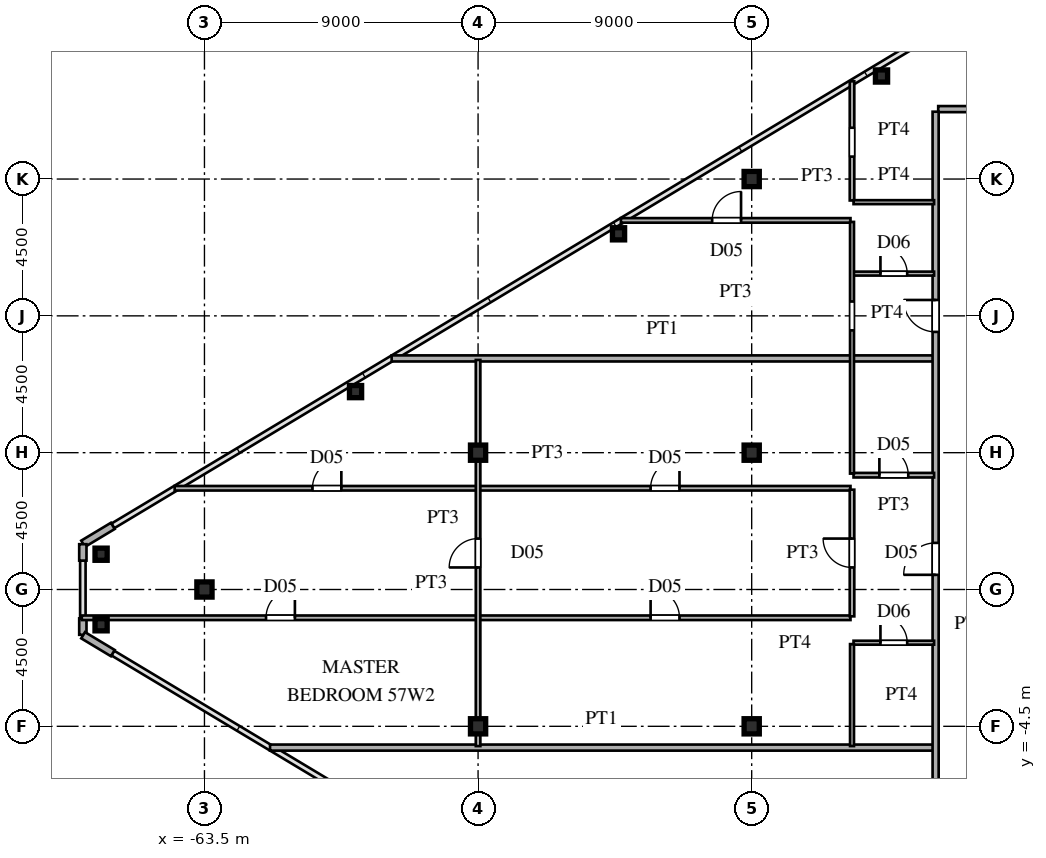
"""IFC4 building model, lengths in metres.
Left out: names, types, materials, properties, quantities, classifications, styles, units other than length and angle.
Written with IfcOpenShell. Run it as: python <this file> out.ifc"""

import sys

from ifc_helpers import new_model, si_unit, direction, frame, frame_2d, origin, origin_2d, place, context, subcontext, project, spatial, rectangle, hollow_rectangle, i_section, extrude, source, transform, mapped, element, fill, save


model = new_model("IFC4")
c1 = context("Model", 3, precision=1e-05, world=origin(), true_north=direction((0.0, 1.0)))
c2 = subcontext(c1, "Body", "Model", "MODEL_VIEW")
j1 = project(units=[si_unit("LENGTHUNIT", "METRE"), si_unit("PLANEANGLEUNIT", "RADIAN")], contexts=[c1])
p1 = place(None, origin())
s1 = spatial("IfcSite", under=j1, at=p1, CompositionType="ELEMENT")
p2 = place(p1, origin())
s2 = spatial("IfcBuilding", under=s1, at=p2, CompositionType="ELEMENT")
p3 = place(p2, frame((0.0, 0.0, 213.9)))
s3 = spatial("IfcBuildingStorey", under=s2, at=p3, CompositionType="ELEMENT", Elevation=213.9)
m1 = source(origin(), c2, "Body", "SweptSolid", [
    extrude(i_section(OverallWidth=0.5, OverallDepth=0.5, WebThickness=0.02, FlangeThickness=0.032, at=origin_2d()), origin(), (0.0, 0.0, 1.0), 3.6),
])
for number, where, z_axis, x_axis in (
    (1, (-45.5, -4.5, 0.0), (0.0, 0.0, 1.0), (1.0, 0.0, 0.0)),
    (2, (-45.5, 4.5, 0.0), (0.0, 0.0, 1.0), (1.0, 0.0, 0.0)),
    (3, (-45.5, 13.5, 0.0), (0.0, 0.0, 1.0), (1.0, 0.0, 0.0)),
    (4, (-54.5, -4.5, 0.0), (0.0, 0.0, 1.0), (1.0, 0.0, 0.0)),
    (5, (-54.5, 4.5, 0.0), (0.0, 0.0, 1.0), (1.0, 0.0, 0.0)),
    (6, (-63.5, 0.0, 0.0), (0.0, 0.0, 1.0), (1.0, 0.0, 0.0)),
):
    element("IfcColumn", number, at=place(p3, frame(where, z_axis=z_axis, x_axis=x_axis)), inside=s3, PredefinedType="COLUMN", context=c2, shape_type="MappedRepresentation", body=[
        mapped(m1, transform((0.0, 0.0, 0.0), scale=1.0)),
    ])
m2 = source(origin(), c2, "Body", "SweptSolid", [
    extrude(hollow_rectangle(XDim=0.4, YDim=0.4, WallThickness=0.016, at=origin_2d()), origin(), (0.0, 0.0, 1.0), 3.6),
])
for number, where, z_axis, x_axis in (
    (7, (-66.9, 1.16, 0.0), (0.0, 0.0, 1.0), (1.0, 0.0, 0.0)),
    (8, (-66.9, -1.16, 0.0), (0.0, 0.0, 1.0), (1.0, 0.0, 0.0)),
    (9, (-41.23, 16.889, 0.0), (0.0, 0.0, 1.0), (1.0, 0.0, 0.0)),
    (10, (-49.88, 11.699, 0.0), (0.0, 0.0, 1.0), (1.0, 0.0, 0.0)),
    (11, (-58.53, 6.509, 0.0), (0.0, 0.0, 1.0), (1.0, 0.0, 0.0)),
):
    element("IfcColumn", number, at=place(p3, frame(where, z_axis=z_axis, x_axis=x_axis)), inside=s3, PredefinedType="COLUMN", context=c2, shape_type="MappedRepresentation", body=[
        mapped(m2, transform((0.0, 0.0, 0.0), scale=1.0)),
    ])
p4 = place(p3, frame((-66.514, 2.092, 0.0), z_axis=(0.0, 0.0, 1.0), x_axis=(-0.85743623509, -0.514590228002, 0.0)))
e12 = element("IfcWall", 12, at=p4, inside=s3, PredefinedType="SOLIDWALL", context=c2, shape_type="SweptSolid", body=[
    extrude(rectangle(XDim=1.14, YDim=0.24, at=frame_2d((0.57, 0.0))), origin(), (0.0, 0.0, 1.0), 3.38),
])
for number, where, z_axis, x_axis in (
    (13, (-67.5, 1.49, 0.0), (0.0, 0.0, 1.0), (0.0, -1.0, 0.0)),
    (14, (-67.5, -0.95, 0.0), (0.0, 0.0, 1.0), (0.0, -1.0, 0.0)),
):
    element("IfcWall", number, at=place(p3, frame(where, z_axis=z_axis, x_axis=x_axis)), inside=s3, PredefinedType="SOLIDWALL", context=c2, shape_type="SweptSolid", body=[
        extrude(rectangle(XDim=0.54, YDim=0.24, at=frame_2d((0.27, 0.0))), origin(), (0.0, 0.0, 1.0), 3.38),
    ])
p5 = place(p3, frame((-67.491, -1.505, 0.0), z_axis=(0.0, 0.0, 1.0), x_axis=(0.85743623509, -0.514590228002, 0.0)))
e15 = element("IfcWall", 15, at=p5, inside=s3, PredefinedType="SOLIDWALL", context=c2, shape_type="SweptSolid", body=[
    extrude(rectangle(XDim=1.14, YDim=0.24, at=frame_2d((0.57, 0.0))), origin(), (0.0, 0.0, 1.0), 3.38),
])
p6 = place(p3, frame((-61.343, -5.2, 0.0), z_axis=(0.0, 0.0, 1.0), x_axis=(1.0, 0.0, 0.0)))
e16 = element("IfcWall", 16, at=p6, inside=s3, PredefinedType="PARTITIONING", context=c2, shape_type="SweptSolid", body=[
    extrude(rectangle(XDim=21.813, YDim=0.2, at=frame_2d((10.906, 0.0))), origin(), (0.0, 0.0, 1.0), 3.38),
])
p7 = place(p3, frame((-42.15, -1.75, 0.0), z_axis=(0.0, 0.0, 1.0), x_axis=(1.0, 0.0, 0.0)))
e17 = element("IfcWall", 17, at=p7, inside=s3, PredefinedType="PARTITIONING", context=c2, shape_type="SweptSolid", body=[
    extrude(rectangle(XDim=2.65, YDim=0.13, at=frame_2d((1.325, 0.0))), origin(), (0.0, 0.0, 1.0), 3.38),
])
p8 = place(p7, frame((0.885, 0.0, 0.0)))
e18 = element("IfcOpeningElement", 18, at=p8, cuts=e17, PredefinedType="OPENING", context=c2, shape_type="SweptSolid", body=[
    extrude(rectangle(XDim=0.88, YDim=2.1, at=frame_2d((0.44, 1.05))), frame((0.0, 0.075, 0.0), z_axis=(0.0, -1.0, 0.0), x_axis=(1.0, 0.0, 0.0)), (0.0, 0.0, 1.0), 0.15),
])
p9 = place(p3, frame((-67.535, -0.93, 0.0), z_axis=(0.0, 0.0, 1.0), x_axis=(1.0, 0.0, 0.0)))
e19 = element("IfcWall", 19, at=p9, inside=s3, PredefinedType="PARTITIONING", context=c2, shape_type="SweptSolid", body=[
    extrude(rectangle(XDim=25.285, YDim=0.15, at=frame_2d((12.643, 0.0))), origin(), (0.0, 0.0, 1.0), 3.38),
])
p10 = place(p9, frame((18.71, 0.0, 0.0)))
e20 = element("IfcOpeningElement", 20, at=p10, cuts=e19, PredefinedType="OPENING", context=c2, shape_type="SweptSolid", body=[
    extrude(rectangle(XDim=0.95, YDim=2.15, at=frame_2d((0.475, 1.075))), frame((0.0, 0.085, 0.0), z_axis=(0.0, -1.0, 0.0), x_axis=(1.0, 0.0, 0.0)), (0.0, 0.0, 1.0), 0.17),
])
p11 = place(p9, frame((6.06, 0.0, 0.0)))
e21 = element("IfcOpeningElement", 21, at=p11, cuts=e19, PredefinedType="OPENING", context=c2, shape_type="SweptSolid", body=[
    extrude(rectangle(XDim=0.95, YDim=2.15, at=frame_2d((0.475, 1.075))), frame((0.0, 0.085, 0.0), z_axis=(0.0, -1.0, 0.0), x_axis=(1.0, 0.0, 0.0)), (0.0, 0.0, 1.0), 0.17),
])
p12 = place(p3, frame((-64.48, 3.33, 0.0), z_axis=(0.0, 0.0, 1.0), x_axis=(1.0, 0.0, 0.0)))
e22 = element("IfcWall", 22, at=p12, inside=s3, PredefinedType="PARTITIONING", context=c2, shape_type="SweptSolid", body=[
    extrude(rectangle(XDim=22.23, YDim=0.15, at=frame_2d((11.115, 0.0))), origin(), (0.0, 0.0, 1.0), 3.38),
])
p13 = place(p12, frame((15.655, 0.0, 0.0)))
e23 = element("IfcOpeningElement", 23, at=p13, cuts=e22, PredefinedType="OPENING", context=c2, shape_type="SweptSolid", body=[
    extrude(rectangle(XDim=0.95, YDim=2.15, at=frame_2d((0.475, 1.075))), frame((0.0, 0.085, 0.0), z_axis=(0.0, -1.0, 0.0), x_axis=(1.0, 0.0, 0.0)), (0.0, 0.0, 1.0), 0.17),
])
p14 = place(p12, frame((4.533, 0.0, 0.0)))
e24 = element("IfcOpeningElement", 24, at=p14, cuts=e22, PredefinedType="OPENING", context=c2, shape_type="SweptSolid", body=[
    extrude(rectangle(XDim=0.95, YDim=2.15, at=frame_2d((0.475, 1.075))), frame((0.0, 0.085, 0.0), z_axis=(0.0, -1.0, 0.0), x_axis=(1.0, 0.0, 0.0)), (0.0, 0.0, 1.0), 0.17),
])
p15 = place(p3, frame((-42.15, 3.76, 0.0), z_axis=(0.0, 0.0, 1.0), x_axis=(1.0, 0.0, 0.0)))
e25 = element("IfcWall", 25, at=p15, inside=s3, PredefinedType="PARTITIONING", context=c2, shape_type="SweptSolid", body=[
    extrude(rectangle(XDim=2.65, YDim=0.15, at=frame_2d((1.325, 0.0))), origin(), (0.0, 0.0, 1.0), 3.38),
])
p16 = place(p15, frame((0.85, 0.0, 0.0)))
e26 = element("IfcOpeningElement", 26, at=p16, cuts=e25, PredefinedType="OPENING", context=c2, shape_type="SweptSolid", body=[
    extrude(rectangle(XDim=0.95, YDim=2.15, at=frame_2d((0.475, 1.075))), frame((0.0, 0.085, 0.0), z_axis=(0.0, -1.0, 0.0), x_axis=(1.0, 0.0, 0.0)), (0.0, 0.0, 1.0), 0.17),
])
p17 = place(p3, frame((-57.343, 7.6, 0.0), z_axis=(0.0, 0.0, 1.0), x_axis=(1.0, 0.0, 0.0)))
e27 = element("IfcWall", 27, at=p17, inside=s3, PredefinedType="PARTITIONING", context=c2, shape_type="SweptSolid", body=[
    extrude(rectangle(XDim=17.813, YDim=0.2, at=frame_2d((8.906, 0.0))), origin(), (0.0, 0.0, 1.0), 3.38),
])
p18 = place(p3, frame((-42.15, 10.39, 0.0), z_axis=(0.0, 0.0, 1.0), x_axis=(1.0, 0.0, 0.0)))
e28 = element("IfcWall", 28, at=p18, inside=s3, PredefinedType="PARTITIONING", context=c2, shape_type="SweptSolid", body=[
    extrude(rectangle(XDim=2.65, YDim=0.13, at=frame_2d((1.325, 0.0))), origin(), (0.0, 0.0, 1.0), 3.38),
])
p19 = place(p18, frame((0.885, 0.0, 0.0)))
e29 = element("IfcOpeningElement", 29, at=p19, cuts=e28, PredefinedType="OPENING", context=c2, shape_type="SweptSolid", body=[
    extrude(rectangle(XDim=0.88, YDim=2.1, at=frame_2d((0.44, 1.05))), frame((0.0, 0.075, 0.0), z_axis=(0.0, -1.0, 0.0), x_axis=(1.0, 0.0, 0.0)), (0.0, 0.0, 1.0), 0.15),
])
p20 = place(p3, frame((-49.802, 12.14, 0.0), z_axis=(0.0, 0.0, 1.0), x_axis=(1.0, 0.0, 0.0)))
e30 = element("IfcWall", 30, at=p20, inside=s3, PredefinedType="PARTITIONING", context=c2, shape_type="SweptSolid", body=[
    extrude(rectangle(XDim=7.552, YDim=0.15, at=frame_2d((3.776, 0.0))), origin(), (0.0, 0.0, 1.0), 3.38),
])
p21 = place(p20, frame((3.002, 0.0, 0.0)))
e31 = element("IfcOpeningElement", 31, at=p21, cuts=e30, PredefinedType="OPENING", context=c2, shape_type="SweptSolid", body=[
    extrude(rectangle(XDim=0.95, YDim=2.15, at=frame_2d((0.475, 1.075))), frame((0.0, 0.085, 0.0), z_axis=(0.0, -1.0, 0.0), x_axis=(1.0, 0.0, 0.0)), (0.0, 0.0, 1.0), 0.17),
])
p22 = place(p3, frame((-42.15, 12.74, 0.0), z_axis=(0.0, 0.0, 1.0), x_axis=(1.0, 0.0, 0.0)))
e32 = element("IfcWall", 32, at=p22, inside=s3, PredefinedType="PARTITIONING", context=c2, shape_type="SweptSolid", body=[
    extrude(rectangle(XDim=2.65, YDim=0.13, at=frame_2d((1.325, 0.0))), origin(), (0.0, 0.0, 1.0), 3.38),
])
p23 = place(p3, frame((-39.365, 15.8, 0.0), z_axis=(0.0, 0.0, 1.0), x_axis=(1.0, 0.0, 0.0)))
e33 = element("IfcWall", 33, at=p23, inside=s3, PredefinedType="PARTITIONING", context=c2, shape_type="SweptSolid", body=[
    extrude(rectangle(XDim=11.74, YDim=0.2, at=frame_2d((5.87, 0.0))), origin(), (0.0, 0.0, 1.0), 3.38),
])
p24 = place(p3, frame((-54.5, -5.15, 0.0), z_axis=(0.0, 0.0, 1.0), x_axis=(0.0, 1.0, 0.0)))
e34 = element("IfcWall", 34, at=p24, inside=s3, PredefinedType="PARTITIONING", context=c2, shape_type="SweptSolid", body=[
    extrude(rectangle(XDim=12.7, YDim=0.15, at=frame_2d((6.35, 0.0))), origin(), (0.0, 0.0, 1.0), 2.78),
])
p25 = place(p24, frame((5.875, 0.0, 0.0)))
e35 = element("IfcOpeningElement", 35, at=p25, cuts=e34, PredefinedType="OPENING", context=c2, shape_type="SweptSolid", body=[
    extrude(rectangle(XDim=0.95, YDim=2.15, at=frame_2d((0.475, 1.075))), frame((0.0, 0.085, 0.0), z_axis=(0.0, -1.0, 0.0), x_axis=(1.0, 0.0, 0.0)), (0.0, 0.0, 1.0), 0.17),
])
p26 = place(p3, frame((-42.2, -5.15, 0.0), z_axis=(0.0, 0.0, 1.0), x_axis=(0.0, 1.0, 0.0)))
e36 = element("IfcWall", 36, at=p26, inside=s3, PredefinedType="PARTITIONING", context=c2, shape_type="SweptSolid", body=[
    extrude(rectangle(XDim=3.354, YDim=0.13, at=frame_2d((1.677, 0.0))), origin(), (0.0, 0.0, 1.0), 3.38),
])
p27 = place(p3, frame((-42.2, -0.883, 0.0), z_axis=(0.0, 0.0, 1.0), x_axis=(0.0, 1.0, 0.0)))
e37 = element("IfcWall", 37, at=p27, inside=s3, PredefinedType="PARTITIONING", context=c2, shape_type="SweptSolid", body=[
    extrude(rectangle(XDim=4.166, YDim=0.15, at=frame_2d((2.083, 0.0))), origin(), (0.0, 0.0, 1.0), 3.38),
])
p28 = place(p27, frame((1.608, 0.0, 0.0)))
e38 = element("IfcOpeningElement", 38, at=p28, cuts=e37, PredefinedType="OPENING", context=c2, shape_type="SweptSolid", body=[
    extrude(rectangle(XDim=0.95, YDim=2.15, at=frame_2d((0.475, 1.075))), frame((0.0, 0.085, 0.0), z_axis=(0.0, -1.0, 0.0), x_axis=(1.0, 0.0, 0.0)), (0.0, 0.0, 1.0), 0.17),
])
p29 = place(p3, frame((-42.2, 3.812, 0.0), z_axis=(0.0, 0.0, 1.0), x_axis=(0.0, 1.0, 0.0)))
e39 = element("IfcWall", 39, at=p29, inside=s3, PredefinedType="PARTITIONING", context=c2, shape_type="SweptSolid", body=[
    extrude(rectangle(XDim=8.278, YDim=0.13, at=frame_2d((4.139, 0.0))), origin(), (0.0, 0.0, 1.0), 3.38),
])
p30 = place(p29, frame((4.71, 0.0, 0.0)))
e40 = element("IfcOpeningElement", 40, at=p30, cuts=e39, PredefinedType="OPENING", context=c2, shape_type="SweptSolid", body=[
    extrude(rectangle(XDim=0.95, YDim=2.15, at=frame_2d((0.475, 1.075))), frame((0.0, 0.075, 0.0), z_axis=(0.0, -1.0, 0.0), x_axis=(1.0, 0.0, 0.0)), (0.0, 0.0, 1.0), 0.15),
])
p31 = place(p3, frame((-42.2, 12.795, 0.0), z_axis=(0.0, 0.0, 1.0), x_axis=(0.0, 1.0, 0.0)))
e41 = element("IfcWall", 41, at=p31, inside=s3, PredefinedType="PARTITIONING", context=c2, shape_type="SweptSolid", body=[
    extrude(rectangle(XDim=3.92, YDim=0.15, at=frame_2d((1.96, 0.0))), origin(), (0.0, 0.0, 1.0), 3.38),
])
p32 = place(p31, frame((1.442, 0.0, 0.0)))
e42 = element("IfcOpeningElement", 42, at=p32, cuts=e41, PredefinedType="OPENING", context=c2, shape_type="SweptSolid", body=[
    extrude(rectangle(XDim=0.95, YDim=2.15, at=frame_2d((0.475, 1.075))), frame((0.0, 0.085, 0.0), z_axis=(0.0, -1.0, 0.0), x_axis=(1.0, 0.0, 0.0)), (0.0, 0.0, 1.0), 0.17),
])
p33 = place(p3, frame((-39.45, -15.715, 0.0), z_axis=(0.0, 0.0, 1.0), x_axis=(0.0, 1.0, 0.0)))
e43 = element("IfcWall", 43, at=p33, inside=s3, PredefinedType="PARTITIONING", context=c2, shape_type="SweptSolid", body=[
    extrude(rectangle(XDim=31.43, YDim=0.2, at=frame_2d((15.715, 0.0))), origin(), (0.0, 0.0, 1.0), 3.38),
])
p34 = place(p33, frame((4.69, 0.0, 0.0)))
e44 = element("IfcOpeningElement", 44, at=p34, cuts=e43, PredefinedType="OPENING", context=c2, shape_type="SweptSolid", body=[
    extrude(rectangle(XDim=1.05, YDim=2.25, at=frame_2d((0.525, 1.125))), frame((0.0, 0.11, 0.0), z_axis=(0.0, -1.0, 0.0), x_axis=(1.0, 0.0, 0.0)), (0.0, 0.0, 1.0), 0.22),
])
p35 = place(p33, frame((16.198, 0.0, 0.0)))
e45 = element("IfcOpeningElement", 45, at=p35, cuts=e43, PredefinedType="OPENING", context=c2, shape_type="SweptSolid", body=[
    extrude(rectangle(XDim=1.05, YDim=2.25, at=frame_2d((0.525, 1.125))), frame((0.0, 0.11, 0.0), z_axis=(0.0, -1.0, 0.0), x_axis=(1.0, 0.0, 0.0)), (0.0, 0.0, 1.0), 0.22),
])
p36 = place(p33, frame((24.188, 0.0, 0.0)))
e46 = element("IfcOpeningElement", 46, at=p36, cuts=e43, PredefinedType="OPENING", context=c2, shape_type="SweptSolid", body=[
    extrude(rectangle(XDim=1.05, YDim=2.25, at=frame_2d((0.525, 1.125))), frame((0.0, 0.11, 0.0), z_axis=(0.0, -1.0, 0.0), x_axis=(1.0, 0.0, 0.0)), (0.0, 0.0, 1.0), 0.22),
])
m3 = source(origin(), c2, "Body", "SweptSolid", [
    extrude(rectangle(XDim=0.88, YDim=2.1, at=frame_2d((0.44, 1.05))), frame((0.0, 0.025, 0.0), z_axis=(0.0, -1.0, 0.0), x_axis=(1.0, 0.0, 0.0)), (0.0, 0.0, 1.0), 0.05),
])
p37 = place(p8, origin())
e47 = element("IfcDoor", 47, at=p37, inside=s3, OperationType="SINGLE_SWING_LEFT", PredefinedType="DOOR", context=c2, shape_type="MappedRepresentation", body=[
    mapped(m3, transform((0.0, 0.0, 0.0), scale=1.0)),
])
fill(e18, e47)
m4 = source(origin(), c2, "Body", "SweptSolid", [
    extrude(rectangle(XDim=0.95, YDim=2.15, at=frame_2d((0.475, 1.075))), frame((0.0, 0.025, 0.0), z_axis=(0.0, -1.0, 0.0), x_axis=(1.0, 0.0, 0.0)), (0.0, 0.0, 1.0), 0.05),
])
p38 = place(p10, origin())
e48 = element("IfcDoor", 48, at=p38, inside=s3, OperationType="SINGLE_SWING_LEFT", PredefinedType="DOOR", context=c2, shape_type="MappedRepresentation", body=[
    mapped(m4, transform((0.0, 0.0, 0.0), scale=1.0)),
])
fill(e20, e48)
p39 = place(p11, origin())
e49 = element("IfcDoor", 49, at=p39, inside=s3, OperationType="SINGLE_SWING_RIGHT", PredefinedType="DOOR", context=c2, shape_type="MappedRepresentation", body=[
    mapped(m4, transform((0.0, 0.0, 0.0), scale=1.0)),
])
fill(e21, e49)
p40 = place(p13, origin())
e50 = element("IfcDoor", 50, at=p40, inside=s3, OperationType="SINGLE_SWING_RIGHT", PredefinedType="DOOR", context=c2, shape_type="MappedRepresentation", body=[
    mapped(m4, transform((0.0, 0.0, 0.0), scale=1.0)),
])
fill(e23, e50)
p41 = place(p14, origin())
e51 = element("IfcDoor", 51, at=p41, inside=s3, OperationType="SINGLE_SWING_RIGHT", PredefinedType="DOOR", context=c2, shape_type="MappedRepresentation", body=[
    mapped(m4, transform((0.0, 0.0, 0.0), scale=1.0)),
])
fill(e24, e51)
p42 = place(p16, origin())
e52 = element("IfcDoor", 52, at=p42, inside=s3, OperationType="SINGLE_SWING_LEFT", PredefinedType="DOOR", context=c2, shape_type="MappedRepresentation", body=[
    mapped(m4, transform((0.0, 0.0, 0.0), scale=1.0)),
])
fill(e26, e52)
p43 = place(p19, origin())
e53 = element("IfcDoor", 53, at=p43, inside=s3, OperationType="SINGLE_SWING_LEFT", PredefinedType="DOOR", context=c2, shape_type="MappedRepresentation", body=[
    mapped(m3, transform((0.0, 0.0, 0.0), scale=1.0)),
])
fill(e29, e53)
p44 = place(p21, origin())
e54 = element("IfcDoor", 54, at=p44, inside=s3, OperationType="SINGLE_SWING_RIGHT", PredefinedType="DOOR", context=c2, shape_type="MappedRepresentation", body=[
    mapped(m4, transform((0.0, 0.0, 0.0), scale=1.0)),
])
fill(e31, e54)
p45 = place(p25, origin())
e55 = element("IfcDoor", 55, at=p45, inside=s3, OperationType="SINGLE_SWING_LEFT", PredefinedType="DOOR", context=c2, shape_type="MappedRepresentation", body=[
    mapped(m4, transform((0.0, 0.0, 0.0), scale=1.0)),
])
fill(e35, e55)
p46 = place(p28, origin())
e56 = element("IfcDoor", 56, at=p46, inside=s3, OperationType="SINGLE_SWING_RIGHT", PredefinedType="DOOR", context=c2, shape_type="MappedRepresentation", body=[
    mapped(m4, transform((0.0, 0.0, 0.0), scale=1.0)),
])
fill(e38, e56)
m5 = source(origin(), c2, "Body", "SweptSolid", [
    extrude(rectangle(XDim=1.05, YDim=2.25, at=frame_2d((0.525, 1.125))), frame((0.0, 0.025, 0.0), z_axis=(0.0, -1.0, 0.0), x_axis=(1.0, 0.0, 0.0)), (0.0, 0.0, 1.0), 0.05),
])
p47 = place(p35, origin())
e57 = element("IfcDoor", 57, at=p47, inside=s3, OperationType="SINGLE_SWING_LEFT", PredefinedType="DOOR", context=c2, shape_type="MappedRepresentation", body=[
    mapped(m5, transform((0.0, 0.0, 0.0), scale=1.0)),
])
fill(e45, e57)
p48 = place(p36, origin())
e58 = element("IfcDoor", 58, at=p48, inside=s3, OperationType="SINGLE_SWING_RIGHT", PredefinedType="DOOR", context=c2, shape_type="MappedRepresentation", body=[
    mapped(m5, transform((0.0, 0.0, 0.0), scale=1.0)),
])
fill(e46, e58)
save(model, sys.argv[1])
